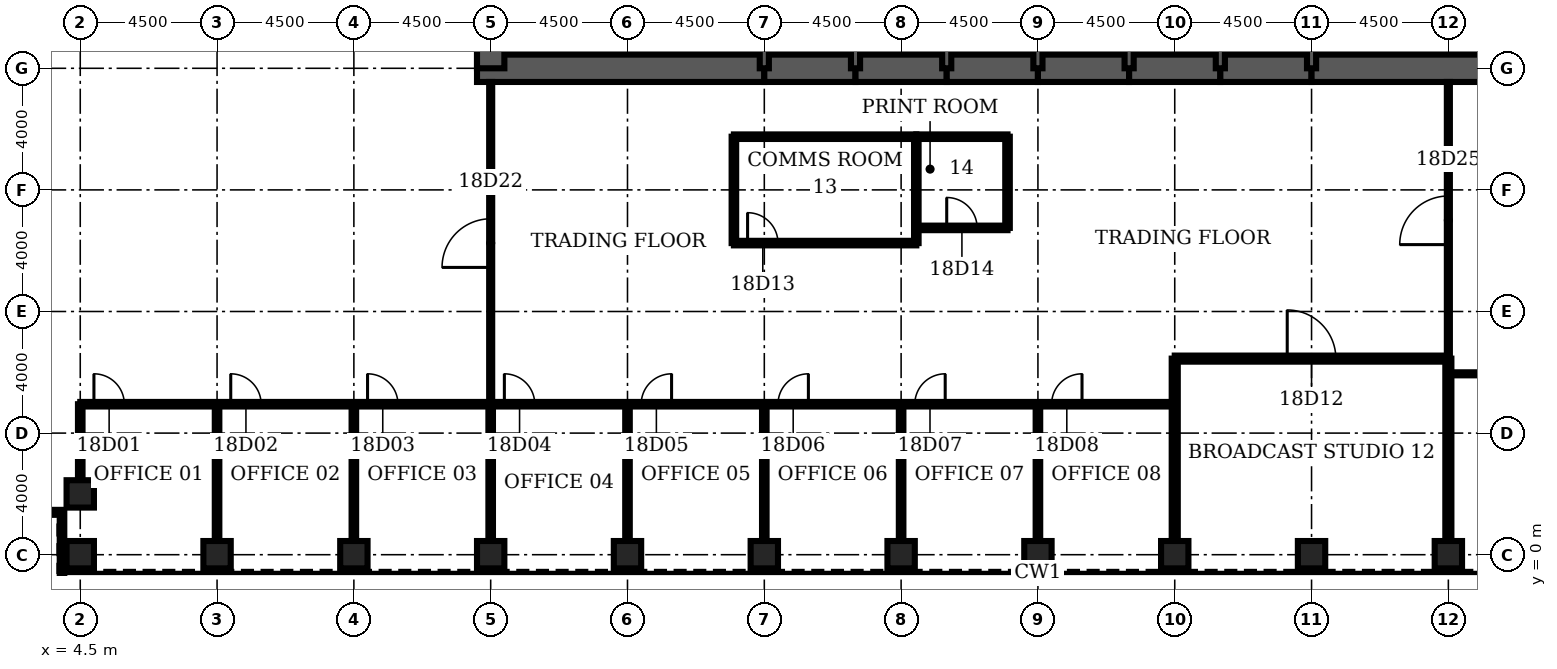
"""IFC4 building model, lengths in metres.
Left out: names, types, materials, properties, quantities, classifications, styles, units other than length and angle.
Written with IfcOpenShell. Run it as: python <this file> out.ifc"""

import sys

from ifc_helpers import new_model, si_unit, direction, frame, frame_2d, origin, origin_2d, place, context, subcontext, project, spatial, rectangle, hollow_rectangle, extrude, element, fill, save


model = new_model("IFC4")
c1 = context("Model", 3, precision=1e-05, world=origin(), true_north=direction((0.0, 1.0)))
c2 = subcontext(c1, "Body", "Model", "MODEL_VIEW")
j1 = project(units=[si_unit("LENGTHUNIT", "METRE"), si_unit("PLANEANGLEUNIT", "RADIAN")], contexts=[c1])
p1 = place(None, origin())
s1 = spatial("IfcSite", under=j1, at=p1, CompositionType="ELEMENT")
p2 = place(p1, origin())
s2 = spatial("IfcBuilding", under=s1, at=p2, CompositionType="ELEMENT")
p3 = place(p2, frame((0.0, 0.0, 86.0)))
s3 = spatial("IfcBuildingStorey", under=s2, at=p3, CompositionType="ELEMENT", Elevation=86.0)
for number, where, z_axis, x_axis in (
    (1, (4.5, 0.0, 0.0), (0.0, 0.0, 1.0), (0.0, 1.0, 0.0)),
    (2, (9.0, 0.0, 0.0), (0.0, 0.0, 1.0), (0.0, 1.0, 0.0)),
    (3, (13.5, 0.0, 0.0), (0.0, 0.0, 1.0), (0.0, 1.0, 0.0)),
    (4, (18.0, 0.0, 0.0), (0.0, 0.0, 1.0), (0.0, 1.0, 0.0)),
    (5, (22.5, 0.0, 0.0), (0.0, 0.0, 1.0), (0.0, 1.0, 0.0)),
    (6, (27.0, 0.0, 0.0), (0.0, 0.0, 1.0), (0.0, 1.0, 0.0)),
    (7, (31.5, 0.0, 0.0), (0.0, 0.0, 1.0), (0.0, 1.0, 0.0)),
    (8, (36.0, 0.0, 0.0), (0.0, 0.0, 1.0), (0.0, 1.0, 0.0)),
    (9, (40.5, 0.0, 0.0), (0.0, 0.0, 1.0), (0.0, 1.0, 0.0)),
    (10, (45.0, 0.0, 0.0), (0.0, 0.0, 1.0), (0.0, 1.0, 0.0)),
    (11, (49.5, 0.0, 0.0), (0.0, 0.0, 1.0), (0.0, 1.0, 0.0)),
    (12, (4.5, 2.0, 0.0), (0.0, 0.0, 1.0), (0.0, 1.0, 0.0)),
):
    element("IfcColumn", number, at=place(p3, frame(where, z_axis=z_axis, x_axis=x_axis)), inside=s3, PredefinedType="COLUMN", context=c2, shape_type="SweptSolid", body=[
        extrude(hollow_rectangle(XDim=0.9, YDim=0.9, WallThickness=0.11, at=origin_2d()), origin(), (0.0, 0.0, 1.0), 4.5),
    ])
p4 = place(p3, frame((17.55, 16.0, 0.0), z_axis=(0.0, 0.0, 1.0), x_axis=(1.0, 0.0, 0.0)))
e13 = element("IfcWall", 13, at=p4, inside=s3, PredefinedType="SHEAR", context=c2, shape_type="SweptSolid", body=[
    extrude(rectangle(XDim=9.45, YDim=0.9, at=frame_2d((4.725, 0.0))), origin(), (0.0, 0.0, 1.0), 4.5),
])
for number, where, z_axis, x_axis in (
    (14, (27.0, 16.0, 0.0), (0.0, 0.0, 1.0), (1.0, 0.0, 0.0)),
    (15, (30.0, 16.0, 0.0), (0.0, 0.0, 1.0), (1.0, 0.0, 0.0)),
    (16, (33.0, 16.0, 0.0), (0.0, 0.0, 1.0), (1.0, 0.0, 0.0)),
    (17, (36.0, 16.0, 0.0), (0.0, 0.0, 1.0), (1.0, 0.0, 0.0)),
    (18, (39.0, 16.0, 0.0), (0.0, 0.0, 1.0), (1.0, 0.0, 0.0)),
    (19, (42.0, 16.0, 0.0), (0.0, 0.0, 1.0), (1.0, 0.0, 0.0)),
):
    element("IfcWall", number, at=place(p3, frame(where, z_axis=z_axis, x_axis=x_axis)), inside=s3, PredefinedType="SHEAR", context=c2, shape_type="SweptSolid", body=[
        extrude(rectangle(XDim=3.0, YDim=0.9, at=frame_2d((1.5, 0.0))), origin(), (0.0, 0.0, 1.0), 4.5),
    ])
p5 = place(p3, frame((45.0, 16.0, 0.0), z_axis=(0.0, 0.0, 1.0), x_axis=(1.0, 0.0, 0.0)))
e20 = element("IfcWall", 20, at=p5, inside=s3, PredefinedType="SHEAR", context=c2, shape_type="SweptSolid", body=[
    extrude(rectangle(XDim=9.45, YDim=0.9, at=frame_2d((4.725, 0.0))), origin(), (0.0, 0.0, 1.0), 4.5),
])
p6 = place(p3, frame((18.0, 19.2, 0.0), z_axis=(0.0, 0.0, 1.0), x_axis=(0.0, -1.0, 0.0)))
e21 = element("IfcWall", 21, at=p6, inside=s3, PredefinedType="SHEAR", context=c2, shape_type="SweptSolid", body=[
    extrude(rectangle(XDim=3.2, YDim=0.9, at=frame_2d((1.6, 0.0))), origin(), (0.0, 0.0, 1.0), 4.5),
])
for number, where, z_axis, x_axis in (
    (22, (27.0, 16.0, 0.0), (0.0, 0.0, 1.0), (0.0, 1.0, 0.0)),
    (23, (30.0, 16.0, 0.0), (0.0, 0.0, 1.0), (0.0, 1.0, 0.0)),
    (24, (33.0, 16.0, 0.0), (0.0, 0.0, 1.0), (0.0, 1.0, 0.0)),
    (25, (36.0, 16.0, 0.0), (0.0, 0.0, 1.0), (0.0, 1.0, 0.0)),
    (26, (39.0, 16.0, 0.0), (0.0, 0.0, 1.0), (0.0, 1.0, 0.0)),
    (27, (42.0, 16.0, 0.0), (0.0, 0.0, 1.0), (0.0, 1.0, 0.0)),
    (28, (45.0, 16.0, 0.0), (0.0, 0.0, 1.0), (0.0, 1.0, 0.0)),
):
    element("IfcWall", number, at=place(p3, frame(where, z_axis=z_axis, x_axis=x_axis)), inside=s3, PredefinedType="SOLIDWALL", context=c2, shape_type="SweptSolid", body=[
        extrude(rectangle(XDim=3.2, YDim=0.3, at=frame_2d((1.6, 0.0))), origin(), (0.0, 0.0, 1.0), 4.5),
    ])
p7 = place(p3, frame((4.5, 4.95, 0.0), z_axis=(0.0, 0.0, 1.0), x_axis=(1.0, 0.0, 0.0)))
e29 = element("IfcWall", 29, at=p7, inside=s3, PredefinedType="PARTITIONING", context=c2, shape_type="SweptSolid", body=[
    extrude(rectangle(XDim=36.0, YDim=0.15, at=frame_2d((18.0, 0.0))), origin(), (0.0, 0.0, 1.0), 3.0),
])
p8 = place(p7, frame((0.45, 0.0, 0.0)))
e30 = element("IfcOpeningElement", 30, at=p8, cuts=e29, PredefinedType="OPENING", context=c2, shape_type="SweptSolid", body=[
    extrude(rectangle(XDim=1.0, YDim=2.1, at=frame_2d((0.5, 1.05))), frame((0.0, 0.085, 0.0), z_axis=(0.0, -1.0, 0.0), x_axis=(1.0, 0.0, 0.0)), (0.0, 0.0, 1.0), 0.17),
])
p9 = place(p7, frame((4.95, 0.0, 0.0)))
e31 = element("IfcOpeningElement", 31, at=p9, cuts=e29, PredefinedType="OPENING", context=c2, shape_type="SweptSolid", body=[
    extrude(rectangle(XDim=1.0, YDim=2.1, at=frame_2d((0.5, 1.05))), frame((0.0, 0.085, 0.0), z_axis=(0.0, -1.0, 0.0), x_axis=(1.0, 0.0, 0.0)), (0.0, 0.0, 1.0), 0.17),
])
p10 = place(p7, frame((9.45, 0.0, 0.0)))
e32 = element("IfcOpeningElement", 32, at=p10, cuts=e29, PredefinedType="OPENING", context=c2, shape_type="SweptSolid", body=[
    extrude(rectangle(XDim=1.0, YDim=2.1, at=frame_2d((0.5, 1.05))), frame((0.0, 0.085, 0.0), z_axis=(0.0, -1.0, 0.0), x_axis=(1.0, 0.0, 0.0)), (0.0, 0.0, 1.0), 0.17),
])
p11 = place(p7, frame((13.95, 0.0, 0.0)))
e33 = element("IfcOpeningElement", 33, at=p11, cuts=e29, PredefinedType="OPENING", context=c2, shape_type="SweptSolid", body=[
    extrude(rectangle(XDim=1.0, YDim=2.1, at=frame_2d((0.5, 1.05))), frame((0.0, 0.085, 0.0), z_axis=(0.0, -1.0, 0.0), x_axis=(1.0, 0.0, 0.0)), (0.0, 0.0, 1.0), 0.17),
])
p12 = place(p7, frame((18.45, 0.0, 0.0)))
e34 = element("IfcOpeningElement", 34, at=p12, cuts=e29, PredefinedType="OPENING", context=c2, shape_type="SweptSolid", body=[
    extrude(rectangle(XDim=1.0, YDim=2.1, at=frame_2d((0.5, 1.05))), frame((0.0, 0.085, 0.0), z_axis=(0.0, -1.0, 0.0), x_axis=(1.0, 0.0, 0.0)), (0.0, 0.0, 1.0), 0.17),
])
p13 = place(p7, frame((22.95, 0.0, 0.0)))
e35 = element("IfcOpeningElement", 35, at=p13, cuts=e29, PredefinedType="OPENING", context=c2, shape_type="SweptSolid", body=[
    extrude(rectangle(XDim=1.0, YDim=2.1, at=frame_2d((0.5, 1.05))), frame((0.0, 0.085, 0.0), z_axis=(0.0, -1.0, 0.0), x_axis=(1.0, 0.0, 0.0)), (0.0, 0.0, 1.0), 0.17),
])
p14 = place(p7, frame((27.45, 0.0, 0.0)))
e36 = element("IfcOpeningElement", 36, at=p14, cuts=e29, PredefinedType="OPENING", context=c2, shape_type="SweptSolid", body=[
    extrude(rectangle(XDim=1.0, YDim=2.1, at=frame_2d((0.5, 1.05))), frame((0.0, 0.085, 0.0), z_axis=(0.0, -1.0, 0.0), x_axis=(1.0, 0.0, 0.0)), (0.0, 0.0, 1.0), 0.17),
])
p15 = place(p7, frame((31.95, 0.0, 0.0)))
e37 = element("IfcOpeningElement", 37, at=p15, cuts=e29, PredefinedType="OPENING", context=c2, shape_type="SweptSolid", body=[
    extrude(rectangle(XDim=1.0, YDim=2.1, at=frame_2d((0.5, 1.05))), frame((0.0, 0.085, 0.0), z_axis=(0.0, -1.0, 0.0), x_axis=(1.0, 0.0, 0.0)), (0.0, 0.0, 1.0), 0.17),
])
p16 = place(p3, frame((49.5, 5.95, 0.0), z_axis=(0.0, 0.0, 1.0), x_axis=(1.0, 0.0, 0.0)))
e38 = element("IfcWall", 38, at=p16, inside=s3, PredefinedType="PARTITIONING", context=c2, shape_type="SweptSolid", body=[
    extrude(rectangle(XDim=9.0, YDim=0.1, at=frame_2d((4.5, 0.0))), origin(), (0.0, 0.0, 1.0), 3.0),
])
p17 = place(p16, frame((4.0, 0.0, 0.0)))
e39 = element("IfcOpeningElement", 39, at=p17, cuts=e38, PredefinedType="OPENING", context=c2, shape_type="SweptSolid", body=[
    extrude(rectangle(XDim=1.0, YDim=2.1, at=frame_2d((0.5, 1.05))), frame((0.0, 0.06, 0.0), z_axis=(0.0, -1.0, 0.0), x_axis=(1.0, 0.0, 0.0)), (0.0, 0.0, 1.0), 0.12),
])
p18 = place(p3, frame((40.5, 6.45, 0.0), z_axis=(0.0, 0.0, 1.0), x_axis=(1.0, 0.0, 0.0)))
e40 = element("IfcWall", 40, at=p18, inside=s3, PredefinedType="PARTITIONING", context=c2, shape_type="SweptSolid", body=[
    extrude(rectangle(XDim=9.0, YDim=0.2, at=frame_2d((4.5, 0.0))), origin(), (0.0, 0.0, 1.0), 3.0),
])
p19 = place(p18, frame((3.7, 0.0, 0.0)))
e41 = element("IfcOpeningElement", 41, at=p19, cuts=e40, PredefinedType="OPENING", context=c2, shape_type="SweptSolid", body=[
    extrude(rectangle(XDim=1.6, YDim=2.1, at=frame_2d((0.8, 1.05))), frame((0.0, 0.11, 0.0), z_axis=(0.0, -1.0, 0.0), x_axis=(1.0, 0.0, 0.0)), (0.0, 0.0, 1.0), 0.22),
])
p20 = place(p3, frame((26.0, 10.25, 0.0), z_axis=(0.0, 0.0, 1.0), x_axis=(1.0, 0.0, 0.0)))
e42 = element("IfcWall", 42, at=p20, inside=s3, PredefinedType="PARTITIONING", context=c2, shape_type="SweptSolid", body=[
    extrude(rectangle(XDim=6.0, YDim=0.15, at=frame_2d((3.0, 0.0))), origin(), (0.0, 0.0, 1.0), 3.0),
])
p21 = place(p20, frame((0.45, 0.0, 0.0)))
e43 = element("IfcOpeningElement", 43, at=p21, cuts=e42, PredefinedType="OPENING", context=c2, shape_type="SweptSolid", body=[
    extrude(rectangle(XDim=1.0, YDim=2.1, at=frame_2d((0.5, 1.05))), frame((0.0, 0.085, 0.0), z_axis=(0.0, -1.0, 0.0), x_axis=(1.0, 0.0, 0.0)), (0.0, 0.0, 1.0), 0.17),
])
p22 = place(p3, frame((32.0, 10.75, 0.0), z_axis=(0.0, 0.0, 1.0), x_axis=(1.0, 0.0, 0.0)))
e44 = element("IfcWall", 44, at=p22, inside=s3, PredefinedType="PARTITIONING", context=c2, shape_type="SweptSolid", body=[
    extrude(rectangle(XDim=3.0, YDim=0.15, at=frame_2d((1.5, 0.0))), origin(), (0.0, 0.0, 1.0), 3.0),
])
p23 = place(p22, frame((1.0, 0.0, 0.0)))
e45 = element("IfcOpeningElement", 45, at=p23, cuts=e44, PredefinedType="OPENING", context=c2, shape_type="SweptSolid", body=[
    extrude(rectangle(XDim=1.0, YDim=2.1, at=frame_2d((0.5, 1.05))), frame((0.0, 0.085, 0.0), z_axis=(0.0, -1.0, 0.0), x_axis=(1.0, 0.0, 0.0)), (0.0, 0.0, 1.0), 0.17),
])
p24 = place(p3, frame((26.0, 13.75, 0.0), z_axis=(0.0, 0.0, 1.0), x_axis=(1.0, 0.0, 0.0)))
e46 = element("IfcWall", 46, at=p24, inside=s3, PredefinedType="PARTITIONING", context=c2, shape_type="SweptSolid", body=[
    extrude(rectangle(XDim=6.0, YDim=0.15, at=frame_2d((3.0, 0.0))), origin(), (0.0, 0.0, 1.0), 3.0),
])
p25 = place(p3, frame((32.0, 13.75, 0.0), z_axis=(0.0, 0.0, 1.0), x_axis=(1.0, 0.0, 0.0)))
e47 = element("IfcWall", 47, at=p25, inside=s3, PredefinedType="PARTITIONING", context=c2, shape_type="SweptSolid", body=[
    extrude(rectangle(XDim=3.0, YDim=0.15, at=frame_2d((1.5, 0.0))), origin(), (0.0, 0.0, 1.0), 3.0),
])
p26 = place(p3, frame((4.5, 2.45, 0.0), z_axis=(0.0, 0.0, 1.0), x_axis=(0.0, 1.0, 0.0)))
e48 = element("IfcWall", 48, at=p26, inside=s3, PredefinedType="PARTITIONING", context=c2, shape_type="SweptSolid", body=[
    extrude(rectangle(XDim=2.5, YDim=0.15, at=frame_2d((1.25, 0.0))), origin(), (0.0, 0.0, 1.0), 3.0),
])
for number, where, z_axis, x_axis in (
    (49, (9.0, 0.45, 0.0), (0.0, 0.0, 1.0), (0.0, 1.0, 0.0)),
    (50, (13.5, 0.45, 0.0), (0.0, 0.0, 1.0), (0.0, 1.0, 0.0)),
    (51, (18.0, 0.45, 0.0), (0.0, 0.0, 1.0), (0.0, 1.0, 0.0)),
):
    element("IfcWall", number, at=place(p3, frame(where, z_axis=z_axis, x_axis=x_axis)), inside=s3, PredefinedType="PARTITIONING", context=c2, shape_type="SweptSolid", body=[
        extrude(rectangle(XDim=4.5, YDim=0.15, at=frame_2d((2.25, 0.0))), origin(), (0.0, 0.0, 1.0), 3.0),
    ])
p27 = place(p3, frame((18.0, 4.95, 0.0), z_axis=(0.0, 0.0, 1.0), x_axis=(0.0, 1.0, 0.0)))
e52 = element("IfcWall", 52, at=p27, inside=s3, PredefinedType="PARTITIONING", context=c2, shape_type="SweptSolid", body=[
    extrude(rectangle(XDim=10.6, YDim=0.1, at=frame_2d((5.3, 0.0))), origin(), (0.0, 0.0, 1.0), 3.0),
])
p28 = place(p27, frame((4.5, 0.0, 0.0)))
e53 = element("IfcOpeningElement", 53, at=p28, cuts=e52, PredefinedType="OPENING", context=c2, shape_type="SweptSolid", body=[
    extrude(rectangle(XDim=1.6, YDim=2.1, at=frame_2d((0.8, 1.05))), frame((0.0, 0.06, 0.0), z_axis=(0.0, -1.0, 0.0), x_axis=(1.0, 0.0, 0.0)), (0.0, 0.0, 1.0), 0.12),
])
p29 = place(p3, frame((22.5, 0.45, 0.0), z_axis=(0.0, 0.0, 1.0), x_axis=(0.0, 1.0, 0.0)))
e54 = element("IfcWall", 54, at=p29, inside=s3, PredefinedType="PARTITIONING", context=c2, shape_type="SweptSolid", body=[
    extrude(rectangle(XDim=4.5, YDim=0.15, at=frame_2d((2.25, 0.0))), origin(), (0.0, 0.0, 1.0), 3.0),
])
p30 = place(p3, frame((26.0, 10.25, 0.0), z_axis=(0.0, 0.0, 1.0), x_axis=(0.0, 1.0, 0.0)))
e55 = element("IfcWall", 55, at=p30, inside=s3, PredefinedType="PARTITIONING", context=c2, shape_type="SweptSolid", body=[
    extrude(rectangle(XDim=3.5, YDim=0.15, at=frame_2d((1.75, 0.0))), origin(), (0.0, 0.0, 1.0), 3.0),
])
for number, where, z_axis, x_axis in (
    (56, (27.0, 0.45, 0.0), (0.0, 0.0, 1.0), (0.0, 1.0, 0.0)),
    (57, (31.5, 0.45, 0.0), (0.0, 0.0, 1.0), (0.0, 1.0, 0.0)),
):
    element("IfcWall", number, at=place(p3, frame(where, z_axis=z_axis, x_axis=x_axis)), inside=s3, PredefinedType="PARTITIONING", context=c2, shape_type="SweptSolid", body=[
        extrude(rectangle(XDim=4.5, YDim=0.15, at=frame_2d((2.25, 0.0))), origin(), (0.0, 0.0, 1.0), 3.0),
    ])
p31 = place(p3, frame((32.0, 10.25, 0.0), z_axis=(0.0, 0.0, 1.0), x_axis=(0.0, 1.0, 0.0)))
e58 = element("IfcWall", 58, at=p31, inside=s3, PredefinedType="PARTITIONING", context=c2, shape_type="SweptSolid", body=[
    extrude(rectangle(XDim=3.5, YDim=0.15, at=frame_2d((1.75, 0.0))), origin(), (0.0, 0.0, 1.0), 3.0),
])
p32 = place(p3, frame((35.0, 10.75, 0.0), z_axis=(0.0, 0.0, 1.0), x_axis=(0.0, 1.0, 0.0)))
e59 = element("IfcWall", 59, at=p32, inside=s3, PredefinedType="PARTITIONING", context=c2, shape_type="SweptSolid", body=[
    extrude(rectangle(XDim=3.0, YDim=0.15, at=frame_2d((1.5, 0.0))), origin(), (0.0, 0.0, 1.0), 3.0),
])
p33 = place(p3, frame((36.0, 0.45, 0.0), z_axis=(0.0, 0.0, 1.0), x_axis=(0.0, 1.0, 0.0)))
e60 = element("IfcWall", 60, at=p33, inside=s3, PredefinedType="PARTITIONING", context=c2, shape_type="SweptSolid", body=[
    extrude(rectangle(XDim=4.5, YDim=0.15, at=frame_2d((2.25, 0.0))), origin(), (0.0, 0.0, 1.0), 3.0),
])
for number, where, z_axis, x_axis in (
    (61, (40.5, 0.45, 0.0), (0.0, 0.0, 1.0), (0.0, 1.0, 0.0)),
    (62, (49.5, 0.45, 0.0), (0.0, 0.0, 1.0), (0.0, 1.0, 0.0)),
):
    element("IfcWall", number, at=place(p3, frame(where, z_axis=z_axis, x_axis=x_axis)), inside=s3, PredefinedType="PARTITIONING", context=c2, shape_type="SweptSolid", body=[
        extrude(rectangle(XDim=6.0, YDim=0.2, at=frame_2d((3.0, 0.0))), origin(), (0.0, 0.0, 1.0), 3.0),
    ])
p34 = place(p3, frame((49.5, 6.45, 0.0), z_axis=(0.0, 0.0, 1.0), x_axis=(0.0, 1.0, 0.0)))
e63 = element("IfcWall", 63, at=p34, inside=s3, PredefinedType="PARTITIONING", context=c2, shape_type="SweptSolid", body=[
    extrude(rectangle(XDim=9.1, YDim=0.1, at=frame_2d((4.55, 0.0))), origin(), (0.0, 0.0, 1.0), 3.0),
])
p35 = place(p34, frame((3.75, 0.0, 0.0)))
e64 = element("IfcOpeningElement", 64, at=p35, cuts=e63, PredefinedType="OPENING", context=c2, shape_type="SweptSolid", body=[
    extrude(rectangle(XDim=1.6, YDim=2.1, at=frame_2d((0.8, 1.05))), frame((0.0, 0.06, 0.0), z_axis=(0.0, -1.0, 0.0), x_axis=(1.0, 0.0, 0.0)), (0.0, 0.0, 1.0), 0.12),
])
p36 = place(p3, frame((1.65, 1.4, 0.0), z_axis=(0.0, 0.0, 1.0), x_axis=(1.0, 0.0, 0.0)))
e65 = element("IfcWall", 65, at=p36, inside=s3, PredefinedType="ELEMENTEDWALL", context=c2, shape_type="SweptSolid", body=[
    extrude(rectangle(XDim=2.25, YDim=0.15, at=frame_2d((1.125, 0.0))), origin(), (0.0, 0.0, 1.0), 4.32),
])
p37 = place(p3, frame((3.9, 1.4, 0.0), z_axis=(0.0, 0.0, 1.0), x_axis=(0.0, -1.0, 0.0)))
e66 = element("IfcWall", 66, at=p37, inside=s3, PredefinedType="ELEMENTEDWALL", context=c2, shape_type="SweptSolid", body=[
    extrude(rectangle(XDim=2.0, YDim=0.15, at=frame_2d((1.0, 0.0))), origin(), (0.0, 0.0, 1.0), 4.32),
])
p38 = place(p8, origin())
e67 = element("IfcDoor", 67, at=p38, inside=s3, OperationType="SINGLE_SWING_LEFT", PredefinedType="DOOR", context=c2, shape_type="SweptSolid", body=[
    extrude(rectangle(XDim=1.0, YDim=2.1, at=frame_2d((0.5, 1.05))), frame((0.0, 0.025, 0.0), z_axis=(0.0, -1.0, 0.0), x_axis=(1.0, 0.0, 0.0)), (0.0, 0.0, 1.0), 0.05),
])
fill(e30, e67)
p39 = place(p9, origin())
e68 = element("IfcDoor", 68, at=p39, inside=s3, OperationType="SINGLE_SWING_LEFT", PredefinedType="DOOR", context=c2, shape_type="SweptSolid", body=[
    extrude(rectangle(XDim=1.0, YDim=2.1, at=frame_2d((0.5, 1.05))), frame((0.0, 0.025, 0.0), z_axis=(0.0, -1.0, 0.0), x_axis=(1.0, 0.0, 0.0)), (0.0, 0.0, 1.0), 0.05),
])
fill(e31, e68)
p40 = place(p10, origin())
e69 = element("IfcDoor", 69, at=p40, inside=s3, OperationType="SINGLE_SWING_LEFT", PredefinedType="DOOR", context=c2, shape_type="SweptSolid", body=[
    extrude(rectangle(XDim=1.0, YDim=2.1, at=frame_2d((0.5, 1.05))), frame((0.0, 0.025, 0.0), z_axis=(0.0, -1.0, 0.0), x_axis=(1.0, 0.0, 0.0)), (0.0, 0.0, 1.0), 0.05),
])
fill(e32, e69)
p41 = place(p11, origin())
e70 = element("IfcDoor", 70, at=p41, inside=s3, OperationType="SINGLE_SWING_LEFT", PredefinedType="DOOR", context=c2, shape_type="SweptSolid", body=[
    extrude(rectangle(XDim=1.0, YDim=2.1, at=frame_2d((0.5, 1.05))), frame((0.0, 0.025, 0.0), z_axis=(0.0, -1.0, 0.0), x_axis=(1.0, 0.0, 0.0)), (0.0, 0.0, 1.0), 0.05),
])
fill(e33, e70)
p42 = place(p12, origin())
e71 = element("IfcDoor", 71, at=p42, inside=s3, OperationType="SINGLE_SWING_RIGHT", PredefinedType="DOOR", context=c2, shape_type="SweptSolid", body=[
    extrude(rectangle(XDim=1.0, YDim=2.1, at=frame_2d((0.5, 1.05))), frame((0.0, 0.025, 0.0), z_axis=(0.0, -1.0, 0.0), x_axis=(1.0, 0.0, 0.0)), (0.0, 0.0, 1.0), 0.05),
])
fill(e34, e71)
p43 = place(p13, origin())
e72 = element("IfcDoor", 72, at=p43, inside=s3, OperationType="SINGLE_SWING_RIGHT", PredefinedType="DOOR", context=c2, shape_type="SweptSolid", body=[
    extrude(rectangle(XDim=1.0, YDim=2.1, at=frame_2d((0.5, 1.05))), frame((0.0, 0.025, 0.0), z_axis=(0.0, -1.0, 0.0), x_axis=(1.0, 0.0, 0.0)), (0.0, 0.0, 1.0), 0.05),
])
fill(e35, e72)
p44 = place(p14, origin())
e73 = element("IfcDoor", 73, at=p44, inside=s3, OperationType="SINGLE_SWING_RIGHT", PredefinedType="DOOR", context=c2, shape_type="SweptSolid", body=[
    extrude(rectangle(XDim=1.0, YDim=2.1, at=frame_2d((0.5, 1.05))), frame((0.0, 0.025, 0.0), z_axis=(0.0, -1.0, 0.0), x_axis=(1.0, 0.0, 0.0)), (0.0, 0.0, 1.0), 0.05),
])
fill(e36, e73)
p45 = place(p15, origin())
e74 = element("IfcDoor", 74, at=p45, inside=s3, OperationType="SINGLE_SWING_RIGHT", PredefinedType="DOOR", context=c2, shape_type="SweptSolid", body=[
    extrude(rectangle(XDim=1.0, YDim=2.1, at=frame_2d((0.5, 1.05))), frame((0.0, 0.025, 0.0), z_axis=(0.0, -1.0, 0.0), x_axis=(1.0, 0.0, 0.0)), (0.0, 0.0, 1.0), 0.05),
])
fill(e37, e74)
p46 = place(p19, origin())
e75 = element("IfcDoor", 75, at=p46, inside=s3, OperationType="SINGLE_SWING_LEFT", PredefinedType="DOOR", context=c2, shape_type="SweptSolid", body=[
    extrude(rectangle(XDim=1.6, YDim=2.1, at=frame_2d((0.8, 1.05))), frame((0.0, 0.025, 0.0), z_axis=(0.0, -1.0, 0.0), x_axis=(1.0, 0.0, 0.0)), (0.0, 0.0, 1.0), 0.05),
])
fill(e41, e75)
p47 = place(p21, origin())
e76 = element("IfcDoor", 76, at=p47, inside=s3, OperationType="SINGLE_SWING_LEFT", PredefinedType="DOOR", context=c2, shape_type="SweptSolid", body=[
    extrude(rectangle(XDim=1.0, YDim=2.1, at=frame_2d((0.5, 1.05))), frame((0.0, 0.025, 0.0), z_axis=(0.0, -1.0, 0.0), x_axis=(1.0, 0.0, 0.0)), (0.0, 0.0, 1.0), 0.05),
])
fill(e43, e76)
p48 = place(p23, origin())
e77 = element("IfcDoor", 77, at=p48, inside=s3, OperationType="SINGLE_SWING_LEFT", PredefinedType="DOOR", context=c2, shape_type="SweptSolid", body=[
    extrude(rectangle(XDim=1.0, YDim=2.1, at=frame_2d((0.5, 1.05))), frame((0.0, 0.025, 0.0), z_axis=(0.0, -1.0, 0.0), x_axis=(1.0, 0.0, 0.0)), (0.0, 0.0, 1.0), 0.05),
])
fill(e45, e77)
p49 = place(p28, origin())
e78 = element("IfcDoor", 78, at=p49, inside=s3, OperationType="SINGLE_SWING_LEFT", PredefinedType="DOOR", context=c2, shape_type="SweptSolid", body=[
    extrude(rectangle(XDim=1.6, YDim=2.1, at=frame_2d((0.8, 1.05))), frame((0.0, 0.025, 0.0), z_axis=(0.0, -1.0, 0.0), x_axis=(1.0, 0.0, 0.0)), (0.0, 0.0, 1.0), 0.05),
])
fill(e53, e78)
p50 = place(p35, origin())
e79 = element("IfcDoor", 79, at=p50, inside=s3, OperationType="SINGLE_SWING_LEFT", PredefinedType="DOOR", context=c2, shape_type="SweptSolid", body=[
    extrude(rectangle(XDim=1.6, YDim=2.1, at=frame_2d((0.8, 1.05))), frame((0.0, 0.025, 0.0), z_axis=(0.0, -1.0, 0.0), x_axis=(1.0, 0.0, 0.0)), (0.0, 0.0, 1.0), 0.05),
])
fill(e64, e79)
save(model, sys.argv[1])
